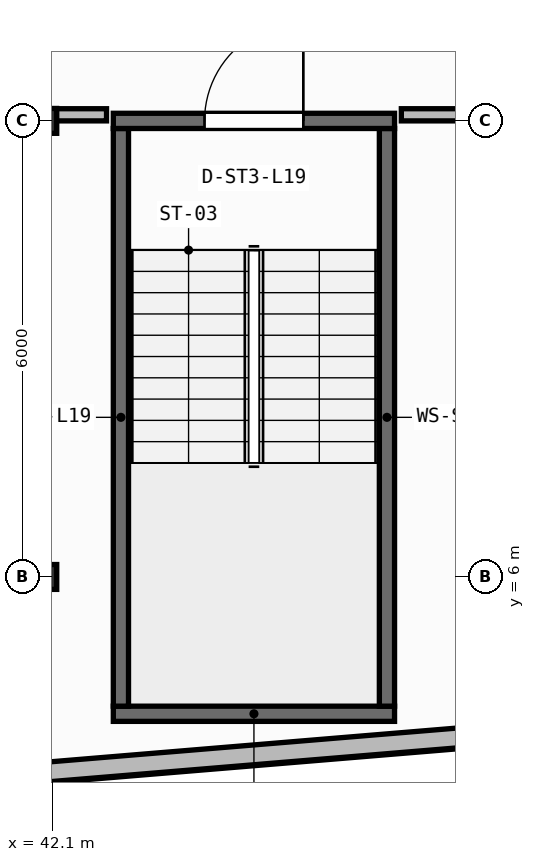
"""IFC4 building model, lengths in metres.
Left out: names, types, materials, properties, quantities, classifications, styles, units other than length and angle.
Written with IfcOpenShell. Run it as: python <this file> out.ifc"""

import sys

from ifc_helpers import new_model, si_unit, direction, frame, frame_2d, origin, origin_2d, place, context, subcontext, project, spatial, rectangle, i_section, extrude, element, fill, save


model = new_model("IFC4")
c1 = context("Model", 3, precision=1e-05, world=origin(), true_north=direction((0.0, 1.0)))
c2 = subcontext(c1, "Body", "Model", "MODEL_VIEW")
j1 = project(units=[si_unit("LENGTHUNIT", "METRE"), si_unit("PLANEANGLEUNIT", "RADIAN")], contexts=[c1])
p1 = place(None, origin())
s1 = spatial("IfcSite", under=j1, at=p1, CompositionType="ELEMENT")
p2 = place(p1, origin())
s2 = spatial("IfcBuilding", under=s1, at=p2, CompositionType="ELEMENT")
p3 = place(p2, frame((0.0, 0.0, 77.8)))
s3 = spatial("IfcBuildingStorey", under=s2, at=p3, CompositionType="ELEMENT", Elevation=77.8)
for number, where, z_axis, x_axis in (
    (1, (42.0, 6.0, 0.0), (0.0, 0.0, 1.0), (1.0, 0.0, 0.0)),
    (2, (42.0, 12.0, 0.0), (0.0, 0.0, 1.0), (1.0, 0.0, 0.0)),
):
    element("IfcColumn", number, at=place(p3, frame(where, z_axis=z_axis, x_axis=x_axis)), inside=s3, PredefinedType="COLUMN", context=c2, shape_type="SweptSolid", body=[
        extrude(i_section(OverallWidth=0.311, OverallDepth=0.327, WebThickness=0.016, FlangeThickness=0.025, FilletRadius=0.017, at=origin_2d()), origin(), (0.0, 0.0, 1.0), 3.95),
    ])
p4 = place(p3, frame((2.76, 0.174, 0.0), z_axis=(0.0, 0.0, 1.0), x_axis=(0.996571478456, 0.082736257641, 0.0)))
e3 = element("IfcWall", 3, at=p4, inside=s3, PredefinedType="STANDARD", context=c2, shape_type="SweptSolid", body=[
    extrude(rectangle(XDim=52.861, YDim=0.26, at=frame_2d((26.431, 0.0))), origin(), (0.0, 0.0, 1.0), 3.71),
])
p5 = place(p4, frame((25.231, 0.0, 0.9)))
e4 = element("IfcOpeningElement", 4, at=p5, cuts=e3, PredefinedType="OPENING", context=c2, shape_type="SweptSolid", body=[
    extrude(rectangle(XDim=2.4, YDim=1.65, at=frame_2d((1.2, 0.825))), frame((0.0, 0.14, 0.0), z_axis=(0.0, -1.0, 0.0), x_axis=(1.0, 0.0, 0.0)), (0.0, 0.0, 1.0), 0.28),
])
p6 = place(p3, frame((42.9, 4.2, 0.0), z_axis=(0.0, 0.0, 1.0), x_axis=(1.0, 0.0, 0.0)))
e5 = element("IfcWall", 5, at=p6, inside=s3, PredefinedType="SHEAR", context=c2, shape_type="SweptSolid", body=[
    extrude(rectangle(XDim=3.7, YDim=0.2, at=frame_2d((1.85, 0.0))), origin(), (0.0, 0.0, 1.0), 3.71),
])
for number, where, z_axis, x_axis in (
    (6, (43.0, 4.3, 0.0), (0.0, 0.0, 1.0), (0.0, 1.0, 0.0)),
    (7, (46.5, 4.3, 0.0), (0.0, 0.0, 1.0), (0.0, 1.0, 0.0)),
):
    element("IfcWall", number, at=place(p3, frame(where, z_axis=z_axis, x_axis=x_axis)), inside=s3, PredefinedType="SHEAR", context=c2, shape_type="SweptSolid", body=[
        extrude(rectangle(XDim=7.6, YDim=0.2, at=frame_2d((3.8, 0.0))), origin(), (0.0, 0.0, 1.0), 3.71),
    ])
p7 = place(p3, frame((42.9, 12.0, 0.0), z_axis=(0.0, 0.0, 1.0), x_axis=(1.0, 0.0, 0.0)))
e8 = element("IfcWall", 8, at=p7, inside=s3, PredefinedType="SHEAR", context=c2, shape_type="SweptSolid", body=[
    extrude(rectangle(XDim=3.7, YDim=0.2, at=frame_2d((1.85, 0.0))), origin(), (0.0, 0.0, 1.0), 3.71),
])
p8 = place(p7, frame((1.2, 0.0, 0.0)))
e9 = element("IfcOpeningElement", 9, at=p8, cuts=e8, PredefinedType="OPENING", context=c2, shape_type="SweptSolid", body=[
    extrude(rectangle(XDim=1.3, YDim=2.15, at=frame_2d((0.65, 1.075))), frame((0.0, 0.11, 0.0), z_axis=(0.0, -1.0, 0.0), x_axis=(1.0, 0.0, 0.0)), (0.0, 0.0, 1.0), 0.22),
])
p9 = place(p3, frame((31.63, 12.08, 0.0), z_axis=(0.0, 0.0, 1.0), x_axis=(1.0, 0.0, 0.0)))
e10 = element("IfcWall", 10, at=p9, inside=s3, PredefinedType="PARTITIONING", context=c2, shape_type="SweptSolid", body=[
    extrude(rectangle(XDim=11.181, YDim=0.16, at=frame_2d((5.59, 0.0))), origin(), (0.0, 0.0, 1.0), 3.073),
])
p10 = place(p3, frame((46.689, 12.08, 0.0), z_axis=(0.0, 0.0, 1.0), x_axis=(1.0, 0.0, 0.0)))
e11 = element("IfcWall", 11, at=p10, inside=s3, PredefinedType="PARTITIONING", context=c2, shape_type="SweptSolid", body=[
    extrude(rectangle(XDim=3.011, YDim=0.16, at=frame_2d((1.505, 0.0))), origin(), (0.0, 0.0, 1.0), 3.073),
])
p11 = place(p8, origin())
e12 = element("IfcDoor", 12, at=p11, inside=s3, OperationType="SINGLE_SWING_RIGHT", PredefinedType="DOOR", context=c2, shape_type="SweptSolid", body=[
    extrude(rectangle(XDim=1.3, YDim=2.15, at=frame_2d((0.65, 1.075))), frame((0.0, 0.025, 0.0), z_axis=(0.0, -1.0, 0.0), x_axis=(1.0, 0.0, 0.0)), (0.0, 0.0, 1.0), 0.05),
])
fill(e9, e12)
save(model, sys.argv[1])
